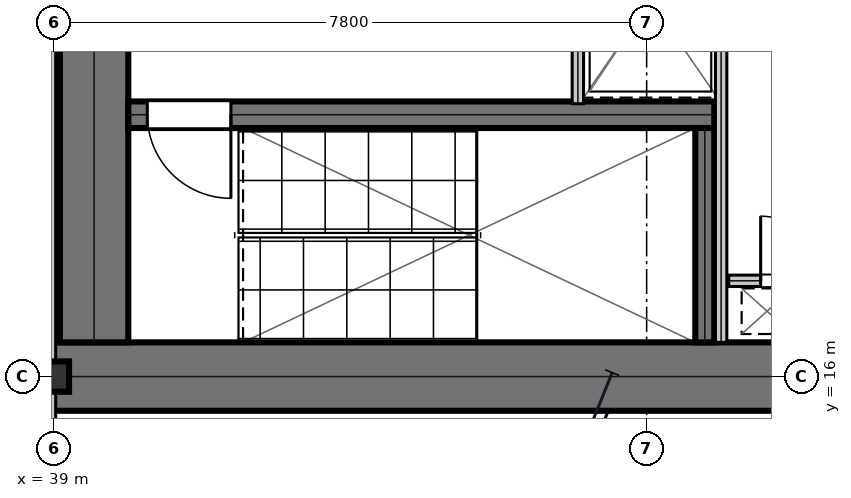
"""IFC4 building model, lengths in metres.
Left out: names, types, materials, properties, quantities, classifications, styles, units other than length and angle.
Written with IfcOpenShell. Run it as: python <this file> out.ifc"""

import sys

from ifc_helpers import new_model, si_unit, direction, frame, frame_2d, origin, origin_2d, place, context, subcontext, project, spatial, rectangle, i_section, extrude, element, fill, save


model = new_model("IFC4")
c1 = context("Model", 3, precision=1e-05, world=origin(), true_north=direction((0.0, 1.0)))
c2 = subcontext(c1, "Body", "Model", "MODEL_VIEW")
j1 = project(units=[si_unit("LENGTHUNIT", "METRE"), si_unit("PLANEANGLEUNIT", "RADIAN")], contexts=[c1])
p1 = place(None, origin())
s1 = spatial("IfcSite", under=j1, at=p1, CompositionType="ELEMENT")
p2 = place(p1, origin())
s2 = spatial("IfcBuilding", under=s1, at=p2, CompositionType="ELEMENT")
p3 = place(p2, frame((0.0, 0.0, 62.1)))
s3 = spatial("IfcBuildingStorey", under=s2, at=p3, CompositionType="ELEMENT", Elevation=62.1)
p4 = place(p3, frame((38.8, 16.0, 0.0), z_axis=(0.0, 0.0, 1.0), x_axis=(1.0, 0.0, 0.0)))
e1 = element("IfcWall", 1, at=p4, inside=s3, PredefinedType="SHEAR", context=c2, shape_type="SweptSolid", body=[
    extrude(rectangle(XDim=16.0, YDim=0.9, at=frame_2d((8.0, 0.0))), origin(), (0.0, 0.0, 1.0), 3.81),
])
p5 = place(p3, frame((39.53, 16.45, 0.0), z_axis=(0.0, 0.0, 1.0), x_axis=(0.0, 1.0, 0.0)))
e2 = element("IfcWall", 2, at=p5, inside=s3, PredefinedType="SHEAR", context=c2, shape_type="SweptSolid", body=[
    extrude(rectangle(XDim=6.15, YDim=0.9, at=frame_2d((3.075, 0.0))), origin(), (0.0, 0.0, 1.0), 3.81),
])
p6 = place(p3, frame((39.98, 19.445, 0.0), z_axis=(0.0, 0.0, 1.0), x_axis=(1.0, 0.0, 0.0)))
e3 = element("IfcWall", 3, at=p6, inside=s3, PredefinedType="SHEAR", context=c2, shape_type="SweptSolid", body=[
    extrude(rectangle(XDim=7.71, YDim=0.35, at=frame_2d((3.855, 0.0))), origin(), (0.0, 0.0, 1.0), 3.81),
])
p7 = place(p6, frame((0.25, 0.0, 0.0)))
e4 = element("IfcOpeningElement", 4, at=p7, cuts=e3, PredefinedType="OPENING", context=c2, shape_type="SweptSolid", body=[
    extrude(rectangle(XDim=1.1, YDim=2.15, at=frame_2d((0.55, 1.075))), frame((0.0, 0.185, 0.0), z_axis=(0.0, -1.0, 0.0), x_axis=(1.0, 0.0, 0.0)), (0.0, 0.0, 1.0), 0.37),
])
p8 = place(p3, frame((47.565, 16.45, 0.0), z_axis=(0.0, 0.0, 1.0), x_axis=(0.0, 1.0, 0.0)))
e5 = element("IfcWall", 5, at=p8, inside=s3, PredefinedType="SHEAR", context=c2, shape_type="SweptSolid", body=[
    extrude(rectangle(XDim=2.82, YDim=0.25, at=frame_2d((1.41, 0.0))), origin(), (0.0, 0.0, 1.0), 3.81),
])
p9 = place(p3, frame((39.0, 16.0, 0.0), z_axis=(0.0, 0.0, 1.0), x_axis=(1.0, 0.0, 0.0)))
e6 = element("IfcColumn", 6, at=p9, inside=s3, PredefinedType="COLUMN", context=c2, shape_type="SweptSolid", body=[
    extrude(i_section(OverallWidth=0.401, OverallDepth=0.399, WebThickness=0.025, FlangeThickness=0.04, at=origin_2d()), origin(), (0.0, 0.0, 1.0), 4.044),
])
p10 = place(p3, frame((45.895, 19.59, 0.0), z_axis=(0.0, 0.0, 1.0), x_axis=(0.0, 1.0, 0.0)))
e7 = element("IfcWall", 7, at=p10, inside=s3, PredefinedType="PARTITIONING", context=c2, shape_type="SweptSolid", body=[
    extrude(rectangle(XDim=2.72, YDim=0.15, at=frame_2d((1.36, 0.0))), origin(), (0.0, 0.0, 1.0), 3.81),
])
p11 = place(p10, frame((0.81, 0.0, 0.0)))
e8 = element("IfcOpeningElement", 8, at=p11, cuts=e7, PredefinedType="OPENING", context=c2, shape_type="SweptSolid", body=[
    extrude(rectangle(XDim=1.1, YDim=2.15, at=frame_2d((0.55, 1.075))), frame((0.0, 0.085, 0.0), z_axis=(0.0, -1.0, 0.0), x_axis=(1.0, 0.0, 0.0)), (0.0, 0.0, 1.0), 0.17),
])
p12 = place(p3, frame((47.88, 17.26, 0.0), z_axis=(0.0, 0.0, 1.0), x_axis=(1.0, 0.0, 0.0)))
e9 = element("IfcWall", 9, at=p12, inside=s3, PredefinedType="PARTITIONING", context=c2, shape_type="SweptSolid", body=[
    extrude(rectangle(XDim=1.72, YDim=0.15, at=frame_2d((0.86, 0.0))), origin(), (0.0, 0.0, 1.0), 3.81),
])
p13 = place(p12, frame((0.42, 0.0, 0.0)))
e10 = element("IfcOpeningElement", 10, at=p13, cuts=e9, PredefinedType="OPENING", context=c2, shape_type="SweptSolid", body=[
    extrude(rectangle(XDim=0.85, YDim=2.15, at=frame_2d((0.425, 1.075))), frame((0.0, 0.085, 0.0), z_axis=(0.0, -1.0, 0.0), x_axis=(1.0, 0.0, 0.0)), (0.0, 0.0, 1.0), 0.17),
])
p14 = place(p3, frame((47.78, 16.45, 0.0), z_axis=(0.0, 0.0, 1.0), x_axis=(0.0, 1.0, 0.0)))
e11 = element("IfcWall", 11, at=p14, inside=s3, PredefinedType="PARTITIONING", context=c2, shape_type="SweptSolid", body=[
    extrude(rectangle(XDim=5.975, YDim=0.15, at=frame_2d((2.988, 0.0))), origin(), (0.0, 0.0, 1.0), 3.81),
])
p15 = place(p3, frame((38.95, 14.5, 0.0), z_axis=(0.0, 0.0, 1.0), x_axis=(0.0, 1.0, 0.0)))
e12 = element("IfcWall", 12, at=p15, inside=s3, PredefinedType="PARTITIONING", context=c2, shape_type="SweptSolid", body=[
    extrude(rectangle(XDim=8.2, YDim=0.15, at=frame_2d((4.1, 0.0))), origin(), (0.0, 0.0, 1.0), 3.181),
])
p16 = place(p13, origin())
e13 = element("IfcDoor", 13, at=p16, inside=s3, OperationType="SINGLE_SWING_LEFT", PredefinedType="TRAPDOOR", context=c2, shape_type="SweptSolid", body=[
    extrude(rectangle(XDim=0.85, YDim=2.15, at=frame_2d((0.425, 1.075))), frame((0.0, 0.025, 0.0), z_axis=(0.0, -1.0, 0.0), x_axis=(1.0, 0.0, 0.0)), (0.0, 0.0, 1.0), 0.05),
])
fill(e10, e13)
p17 = place(p7, frame((1.1, 0.0, 0.0), z_axis=(0.0, 0.0, 1.0), x_axis=(-1.0, 0.0, 0.0)))
e14 = element("IfcDoor", 14, at=p17, inside=s3, OperationType="SINGLE_SWING_LEFT", PredefinedType="DOOR", context=c2, shape_type="SweptSolid", body=[
    extrude(rectangle(XDim=1.1, YDim=2.15, at=frame_2d((0.55, 1.075))), frame((0.0, 0.025, 0.0), z_axis=(0.0, -1.0, 0.0), x_axis=(1.0, 0.0, 0.0)), (0.0, 0.0, 1.0), 0.05),
])
fill(e4, e14)
save(model, sys.argv[1])
